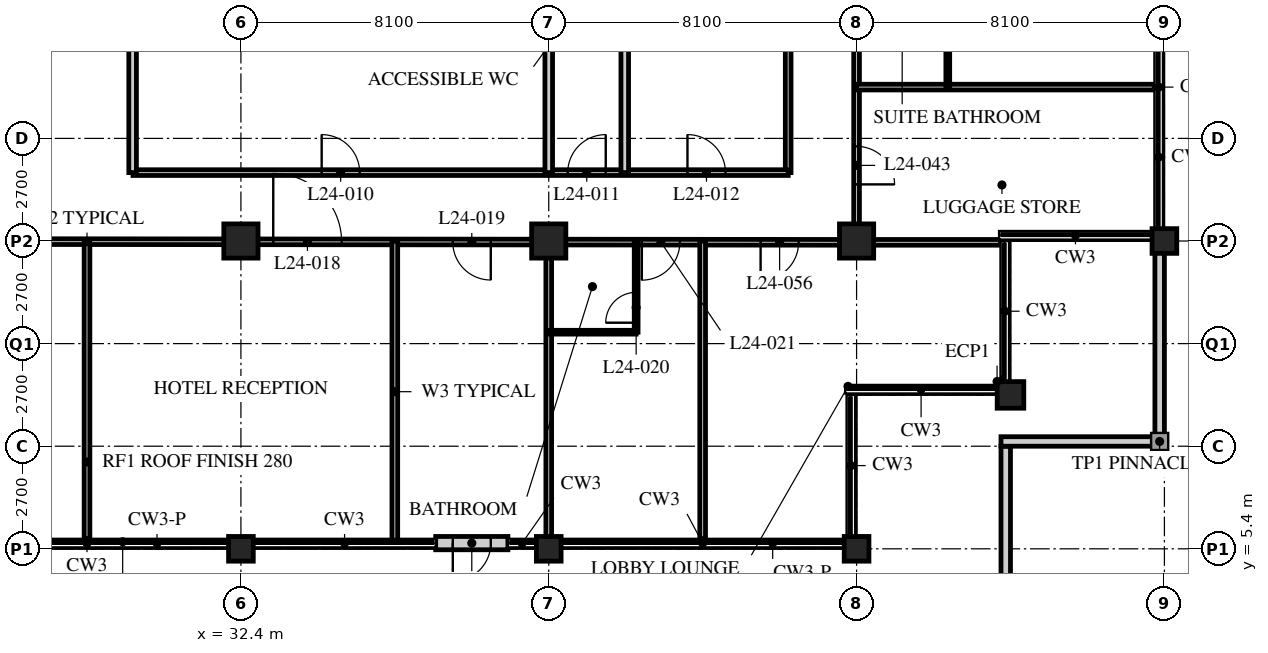
"""IFC4 building model, lengths in metres.
Left out: names, types, materials, properties, quantities, classifications, styles, units other than length and angle.
Written with IfcOpenShell. Run it as: python <this file> out.ifc"""

import sys

from ifc_helpers import new_model, si_unit, direction, frame, frame_2d, origin, origin_2d, place, context, subcontext, project, spatial, rectangle, hollow_rectangle, extrude, element, fill, save


model = new_model("IFC4")
c1 = context("Model", 3, precision=1e-05, world=origin(), true_north=direction((0.0, 1.0)))
c2 = subcontext(c1, "Body", "Model", "MODEL_VIEW")
j1 = project(units=[si_unit("LENGTHUNIT", "METRE"), si_unit("PLANEANGLEUNIT", "RADIAN")], contexts=[c1])
p1 = place(None, origin())
s1 = spatial("IfcSite", under=j1, at=p1, CompositionType="ELEMENT")
p2 = place(p1, origin())
s2 = spatial("IfcBuilding", under=s1, at=p2, CompositionType="ELEMENT")
p3 = place(p2, frame((0.0, 0.0, 98.0)))
s3 = spatial("IfcBuildingStorey", under=s2, at=p3, CompositionType="ELEMENT", Elevation=98.0)
p4 = place(p3, frame((32.4, 5.4, 0.0), z_axis=(0.0, 0.0, 1.0), x_axis=(1.0, 0.0, 0.0)))
e1 = element("IfcColumn", 1, at=p4, inside=s3, PredefinedType="COLUMN", context=c2, shape_type="SweptSolid", body=[
    extrude(hollow_rectangle(XDim=0.65, YDim=0.65, WallThickness=0.05, at=origin_2d()), origin(), (0.0, 0.0, 1.0), 5.4),
])
p5 = place(p3, frame((32.4, 13.5, 0.0), z_axis=(0.0, 0.0, 1.0), x_axis=(1.0, 0.0, 0.0)))
e2 = element("IfcColumn", 2, at=p5, inside=s3, PredefinedType="COLUMN", context=c2, shape_type="SweptSolid", body=[
    extrude(hollow_rectangle(XDim=0.9, YDim=0.9, WallThickness=0.1, at=origin_2d()), origin(), (0.0, 0.0, 1.0), 5.4),
])
p6 = place(p3, frame((40.5, 5.4, 0.0), z_axis=(0.0, 0.0, 1.0), x_axis=(1.0, 0.0, 0.0)))
e3 = element("IfcColumn", 3, at=p6, inside=s3, PredefinedType="COLUMN", context=c2, shape_type="SweptSolid", body=[
    extrude(hollow_rectangle(XDim=0.65, YDim=0.65, WallThickness=0.05, at=origin_2d()), origin(), (0.0, 0.0, 1.0), 5.4),
])
p7 = place(p3, frame((40.5, 13.5, 0.0), z_axis=(0.0, 0.0, 1.0), x_axis=(1.0, 0.0, 0.0)))
e4 = element("IfcColumn", 4, at=p7, inside=s3, PredefinedType="COLUMN", context=c2, shape_type="SweptSolid", body=[
    extrude(hollow_rectangle(XDim=0.9, YDim=0.9, WallThickness=0.1, at=origin_2d()), origin(), (0.0, 0.0, 1.0), 5.4),
])
p8 = place(p3, frame((48.6, 5.4, 0.0), z_axis=(0.0, 0.0, 1.0), x_axis=(1.0, 0.0, 0.0)))
e5 = element("IfcColumn", 5, at=p8, inside=s3, PredefinedType="COLUMN", context=c2, shape_type="SweptSolid", body=[
    extrude(hollow_rectangle(XDim=0.65, YDim=0.65, WallThickness=0.05, at=origin_2d()), origin(), (0.0, 0.0, 1.0), 5.4),
])
p9 = place(p3, frame((48.6, 13.5, 0.0), z_axis=(0.0, 0.0, 1.0), x_axis=(1.0, 0.0, 0.0)))
e6 = element("IfcColumn", 6, at=p9, inside=s3, PredefinedType="COLUMN", context=c2, shape_type="SweptSolid", body=[
    extrude(hollow_rectangle(XDim=0.9, YDim=0.9, WallThickness=0.1, at=origin_2d()), origin(), (0.0, 0.0, 1.0), 5.4),
])
p10 = place(p3, frame((52.65, 9.45, 0.0), z_axis=(0.0, 0.0, 1.0), x_axis=(1.0, 0.0, 0.0)))
e7 = element("IfcColumn", 7, at=p10, inside=s3, PredefinedType="COLUMN", context=c2, shape_type="SweptSolid", body=[
    extrude(hollow_rectangle(XDim=0.7, YDim=0.7, WallThickness=0.07, at=origin_2d()), origin(), (0.0, 0.0, 1.0), 5.4),
])
p11 = place(p3, frame((56.7, 13.5, 0.0), z_axis=(0.0, 0.0, 1.0), x_axis=(1.0, 0.0, 0.0)))
e8 = element("IfcColumn", 8, at=p11, inside=s3, PredefinedType="COLUMN", context=c2, shape_type="SweptSolid", body=[
    extrude(hollow_rectangle(XDim=0.65, YDim=0.65, WallThickness=0.05, at=origin_2d()), origin(), (0.0, 0.0, 1.0), 5.4),
])
p12 = place(p3, frame((37.525, 5.55, 0.0), z_axis=(0.0, 0.0, 1.0), x_axis=(1.0, 0.0, 0.0)))
e9 = element("IfcWall", 9, at=p12, inside=s3, PredefinedType="SOLIDWALL", context=c2, shape_type="SweptSolid", body=[
    extrude(rectangle(XDim=1.9, YDim=0.35, at=frame_2d((0.95, 0.0))), origin(), (0.0, 0.0, 1.0), 4.49),
])
p13 = place(p12, frame((0.45, 0.0, 0.0)))
e10 = element("IfcOpeningElement", 10, at=p13, cuts=e9, PredefinedType="OPENING", context=c2, shape_type="SweptSolid", body=[
    extrude(rectangle(XDim=1.0, YDim=2.1, at=frame_2d((0.5, 1.05))), frame((0.0, 0.185, 0.0), z_axis=(0.0, -1.0, 0.0), x_axis=(1.0, 0.0, 0.0)), (0.0, 0.0, 1.0), 0.37),
])
p14 = place(p3, frame((52.525, 4.3, 0.0), z_axis=(0.0, 0.0, 1.0), x_axis=(0.0, 1.0, 0.0)))
e11 = element("IfcWall", 11, at=p14, inside=s3, PredefinedType="PARAPET", context=c2, shape_type="SweptSolid", body=[
    extrude(rectangle(XDim=3.8, YDim=0.25, at=frame_2d((1.9, 0.0))), origin(), (0.0, 0.0, 1.0), 1.38),
])
p15 = place(p3, frame((52.4, 8.225, 0.0), z_axis=(0.0, 0.0, 1.0), x_axis=(1.0, 0.0, 0.0)))
e12 = element("IfcWall", 12, at=p15, inside=s3, PredefinedType="PARAPET", context=c2, shape_type="SweptSolid", body=[
    extrude(rectangle(XDim=4.3, YDim=0.25, at=frame_2d((2.15, 0.0))), origin(), (0.0, 0.0, 1.0), 1.38),
])
p16 = place(p3, frame((56.575, 8.35, 0.0), z_axis=(0.0, 0.0, 1.0), x_axis=(0.0, 1.0, 0.0)))
e13 = element("IfcWall", 13, at=p16, inside=s3, PredefinedType="PARAPET", context=c2, shape_type="SweptSolid", body=[
    extrude(rectangle(XDim=5.15, YDim=0.25, at=frame_2d((2.575, 0.0))), origin(), (0.0, 0.0, 1.0), 1.38),
])
p17 = place(p3, frame((8.1, 13.5, 0.0), z_axis=(0.0, 0.0, 1.0), x_axis=(0.999999628455, -0.000862027072, 0.0)))
e14 = element("IfcWall", 14, at=p17, inside=s3, PredefinedType="PARTITIONING", context=c2, shape_type="SweptSolid", body=[
    extrude(rectangle(XDim=40.5, YDim=0.15, at=frame_2d((20.25, 0.0))), origin(), (0.0, 0.0, 1.0), 4.49),
])
p18 = place(p17, frame((11.25, 0.0, 0.0)))
e15 = element("IfcOpeningElement", 15, at=p18, cuts=e14, PredefinedType="OPENING", context=c2, shape_type="SweptSolid", body=[
    extrude(rectangle(XDim=1.8, YDim=2.4, at=frame_2d((0.9, 1.2))), frame((0.0, 0.085, 0.0), z_axis=(0.0, -1.0, 0.0), x_axis=(1.0, 0.0, 0.0)), (0.0, 0.0, 1.0), 0.17),
])
p19 = place(p17, frame((25.15, 0.0, 0.0)))
e16 = element("IfcOpeningElement", 16, at=p19, cuts=e14, PredefinedType="OPENING", context=c2, shape_type="SweptSolid", body=[
    extrude(rectangle(XDim=1.8, YDim=2.4, at=frame_2d((0.9, 1.2))), frame((0.0, 0.085, 0.0), z_axis=(0.0, -1.0, 0.0), x_axis=(1.0, 0.0, 0.0)), (0.0, 0.0, 1.0), 0.17),
])
p20 = place(p17, frame((29.875, 0.0, 0.0)))
e17 = element("IfcOpeningElement", 17, at=p20, cuts=e14, PredefinedType="OPENING", context=c2, shape_type="SweptSolid", body=[
    extrude(rectangle(XDim=1.0, YDim=2.1, at=frame_2d((0.5, 1.05))), frame((0.0, 0.085, 0.0), z_axis=(0.0, -1.0, 0.0), x_axis=(1.0, 0.0, 0.0)), (0.0, 0.0, 1.0), 0.17),
])
p21 = place(p17, frame((34.85, 0.0, 0.0)))
e18 = element("IfcOpeningElement", 18, at=p21, cuts=e14, PredefinedType="OPENING", context=c2, shape_type="SweptSolid", body=[
    extrude(rectangle(XDim=1.0, YDim=2.1, at=frame_2d((0.5, 1.05))), frame((0.0, 0.085, 0.0), z_axis=(0.0, -1.0, 0.0), x_axis=(1.0, 0.0, 0.0)), (0.0, 0.0, 1.0), 0.17),
])
p22 = place(p17, frame((1.525, 0.0, 0.0)))
e19 = element("IfcOpeningElement", 19, at=p22, cuts=e14, PredefinedType="OPENING", context=c2, shape_type="SweptSolid", body=[
    extrude(rectangle(XDim=1.0, YDim=2.1, at=frame_2d((0.5, 1.05))), frame((0.0, 0.085, 0.0), z_axis=(0.0, -1.0, 0.0), x_axis=(1.0, 0.0, 0.0)), (0.0, 0.0, 1.0), 0.17),
])
p23 = place(p17, frame((37.975, 0.0, 0.0)))
e20 = element("IfcOpeningElement", 20, at=p23, cuts=e14, PredefinedType="OPENING", context=c2, shape_type="SweptSolid", body=[
    extrude(rectangle(XDim=1.0, YDim=2.1, at=frame_2d((0.5, 1.05))), frame((0.0, 0.085, 0.0), z_axis=(0.0, -1.0, 0.0), x_axis=(1.0, 0.0, 0.0)), (0.0, 0.0, 1.0), 0.17),
])
p24 = place(p3, frame((48.6, 13.465, 0.0), z_axis=(0.0, 0.0, 1.0), x_axis=(0.0, 1.0, 0.0)))
e21 = element("IfcWall", 21, at=p24, inside=s3, PredefinedType="PARTITIONING", context=c2, shape_type="SweptSolid", body=[
    extrude(rectangle(XDim=32.435, YDim=0.15, at=frame_2d((16.217, 0.0))), origin(), (0.0, 0.0, 1.0), 4.49),
])
p25 = place(p24, frame((1.525, 0.0, 0.0)))
e22 = element("IfcOpeningElement", 22, at=p25, cuts=e21, PredefinedType="OPENING", context=c2, shape_type="SweptSolid", body=[
    extrude(rectangle(XDim=1.0, YDim=2.1, at=frame_2d((0.5, 1.05))), frame((0.0, 0.085, 0.0), z_axis=(0.0, -1.0, 0.0), x_axis=(1.0, 0.0, 0.0)), (0.0, 0.0, 1.0), 0.17),
])
p26 = place(p24, frame((9.5, 0.0, 0.0)))
e23 = element("IfcOpeningElement", 23, at=p26, cuts=e21, PredefinedType="OPENING", context=c2, shape_type="SweptSolid", body=[
    extrude(rectangle(XDim=1.0, YDim=2.1, at=frame_2d((0.5, 1.05))), frame((0.0, 0.085, 0.0), z_axis=(0.0, -1.0, 0.0), x_axis=(1.0, 0.0, 0.0)), (0.0, 0.0, 1.0), 0.17),
])
p27 = place(p24, frame((17.6, 0.0, 0.0)))
e24 = element("IfcOpeningElement", 24, at=p27, cuts=e21, PredefinedType="OPENING", context=c2, shape_type="SweptSolid", body=[
    extrude(rectangle(XDim=1.0, YDim=2.1, at=frame_2d((0.5, 1.05))), frame((0.0, 0.085, 0.0), z_axis=(0.0, -1.0, 0.0), x_axis=(1.0, 0.0, 0.0)), (0.0, 0.0, 1.0), 0.17),
])
p28 = place(p24, frame((25.7, 0.0, 0.0)))
e25 = element("IfcOpeningElement", 25, at=p28, cuts=e21, PredefinedType="OPENING", context=c2, shape_type="SweptSolid", body=[
    extrude(rectangle(XDim=1.0, YDim=2.1, at=frame_2d((0.5, 1.05))), frame((0.0, 0.085, 0.0), z_axis=(0.0, -1.0, 0.0), x_axis=(1.0, 0.0, 0.0)), (0.0, 0.0, 1.0), 0.17),
])
p29 = place(p24, frame((28.95, 0.0, 0.0)))
e26 = element("IfcOpeningElement", 26, at=p29, cuts=e21, PredefinedType="OPENING", context=c2, shape_type="SweptSolid", body=[
    extrude(rectangle(XDim=1.0, YDim=2.1, at=frame_2d((0.5, 1.05))), frame((0.0, 0.085, 0.0), z_axis=(0.0, -1.0, 0.0), x_axis=(1.0, 0.0, 0.0)), (0.0, 0.0, 1.0), 0.17),
])
p30 = place(p3, frame((46.8, 15.3, 0.0), z_axis=(0.0, 0.0, 1.0), x_axis=(0.0, 1.0, 0.0)))
e27 = element("IfcWall", 27, at=p30, inside=s3, PredefinedType="PARTITIONING", context=c2, shape_type="SweptSolid", body=[
    extrude(rectangle(XDim=28.8, YDim=0.15, at=frame_2d((14.4, 0.0))), origin(), (0.0, 0.0, 1.0), 5.19),
])
p31 = place(p30, frame((9.775, 0.0, 0.0)))
e28 = element("IfcOpeningElement", 28, at=p31, cuts=e27, PredefinedType="OPENING", context=c2, shape_type="SweptSolid", body=[
    extrude(rectangle(XDim=0.85, YDim=2.1, at=frame_2d((0.425, 1.05))), frame((0.0, 0.085, 0.0), z_axis=(0.0, -1.0, 0.0), x_axis=(1.0, 0.0, 0.0)), (0.0, 0.0, 1.0), 0.17),
])
p32 = place(p30, frame((13.75, 0.0, 0.0)))
e29 = element("IfcOpeningElement", 29, at=p32, cuts=e27, PredefinedType="OPENING", context=c2, shape_type="SweptSolid", body=[
    extrude(rectangle(XDim=1.0, YDim=2.1, at=frame_2d((0.5, 1.05))), frame((0.0, 0.085, 0.0), z_axis=(0.0, -1.0, 0.0), x_axis=(1.0, 0.0, 0.0)), (0.0, 0.0, 1.0), 0.17),
])
p33 = place(p30, frame((20.65, 0.0, 0.0)))
e30 = element("IfcOpeningElement", 30, at=p33, cuts=e27, PredefinedType="OPENING", context=c2, shape_type="SweptSolid", body=[
    extrude(rectangle(XDim=1.0, YDim=2.1, at=frame_2d((0.5, 1.05))), frame((0.0, 0.085, 0.0), z_axis=(0.0, -1.0, 0.0), x_axis=(1.0, 0.0, 0.0)), (0.0, 0.0, 1.0), 0.17),
])
p34 = place(p3, frame((29.56, 15.3, 0.0), z_axis=(0.0, 0.0, 1.0), x_axis=(1.0, 0.0, 0.0)))
e31 = element("IfcWall", 31, at=p34, inside=s3, PredefinedType="PARTITIONING", context=c2, shape_type="SweptSolid", body=[
    extrude(rectangle(XDim=17.24, YDim=0.15, at=frame_2d((8.62, 0.0))), origin(), (0.0, 0.0, 1.0), 5.19),
])
p35 = place(p34, frame((4.965, 0.0, 0.0)))
e32 = element("IfcOpeningElement", 32, at=p35, cuts=e31, PredefinedType="OPENING", context=c2, shape_type="SweptSolid", body=[
    extrude(rectangle(XDim=1.0, YDim=2.1, at=frame_2d((0.5, 1.05))), frame((0.0, 0.085, 0.0), z_axis=(0.0, -1.0, 0.0), x_axis=(1.0, 0.0, 0.0)), (0.0, 0.0, 1.0), 0.17),
])
p36 = place(p34, frame((11.44, 0.0, 0.0)))
e33 = element("IfcOpeningElement", 33, at=p36, cuts=e31, PredefinedType="OPENING", context=c2, shape_type="SweptSolid", body=[
    extrude(rectangle(XDim=1.0, YDim=2.1, at=frame_2d((0.5, 1.05))), frame((0.0, 0.085, 0.0), z_axis=(0.0, -1.0, 0.0), x_axis=(1.0, 0.0, 0.0)), (0.0, 0.0, 1.0), 0.17),
])
p37 = place(p34, frame((14.59, 0.0, 0.0)))
e34 = element("IfcOpeningElement", 34, at=p37, cuts=e31, PredefinedType="OPENING", context=c2, shape_type="SweptSolid", body=[
    extrude(rectangle(XDim=1.0, YDim=2.1, at=frame_2d((0.5, 1.05))), frame((0.0, 0.085, 0.0), z_axis=(0.0, -1.0, 0.0), x_axis=(1.0, 0.0, 0.0)), (0.0, 0.0, 1.0), 0.17),
])
p38 = place(p3, frame((40.5, 15.3, 0.0), z_axis=(0.0, 0.0, 1.0), x_axis=(0.0, 1.0, 0.0)))
e35 = element("IfcWall", 35, at=p38, inside=s3, PredefinedType="SOLIDWALL", context=c2, shape_type="SweptSolid", body=[
    extrude(rectangle(XDim=9.0, YDim=0.2, at=frame_2d((4.5, 0.0))), origin(), (0.0, 0.0, 1.0), 4.49),
])
for number, where, z_axis, x_axis in (
    (36, (42.5, 15.3, 0.0), (0.0, 0.0, 1.0), (0.0, 1.0, 0.0)),
    (37, (29.55, 15.3, 0.0), (0.0, 0.0, 1.0), (0.0, 1.0, 0.0)),
):
    element("IfcWall", number, at=place(p3, frame(where, z_axis=z_axis, x_axis=x_axis)), inside=s3, PredefinedType="SOLIDWALL", context=c2, shape_type="SweptSolid", body=[
        extrude(rectangle(XDim=9.0, YDim=0.2, at=frame_2d((4.5, 0.0))), origin(), (0.0, 0.0, 1.0), 5.19),
    ])
p39 = place(p3, frame((28.35, 13.5, 0.0), z_axis=(0.0, 0.0, 1.0), x_axis=(0.0, -1.0, 0.0)))
e38 = element("IfcWall", 38, at=p39, inside=s3, PredefinedType="PARTITIONING", context=c2, shape_type="SweptSolid", body=[
    extrude(rectangle(XDim=7.834, YDim=0.15, at=frame_2d((3.917, 0.0))), origin(), (0.0, 0.0, 1.0), 5.19),
])
p40 = place(p3, frame((36.45, 13.5, 0.0), z_axis=(0.0, 0.0, 1.0), x_axis=(0.0, -1.0, 0.0)))
e39 = element("IfcWall", 39, at=p40, inside=s3, PredefinedType="PARTITIONING", context=c2, shape_type="SweptSolid", body=[
    extrude(rectangle(XDim=7.93, YDim=0.15, at=frame_2d((3.965, 0.0))), origin(), (0.0, 0.0, 1.0), 5.19),
])
p41 = place(p3, frame((40.5, 13.5, 0.0), z_axis=(0.0, 0.0, 1.0), x_axis=(0.0, -1.0, 0.0)))
e40 = element("IfcWall", 40, at=p41, inside=s3, PredefinedType="PARTITIONING", context=c2, shape_type="SweptSolid", body=[
    extrude(rectangle(XDim=7.8, YDim=0.15, at=frame_2d((3.9, 0.0))), origin(), (0.0, 0.0, 1.0), 4.49),
])
p42 = place(p3, frame((40.5, 11.1, 0.0), z_axis=(0.0, 0.0, 1.0), x_axis=(1.0, 0.0, 0.0)))
e41 = element("IfcWall", 41, at=p42, inside=s3, PredefinedType="PARTITIONING", context=c2, shape_type="SweptSolid", body=[
    extrude(rectangle(XDim=2.3, YDim=0.1, at=frame_2d((1.15, 0.0))), origin(), (0.0, 0.0, 1.0), 5.19),
])
p43 = place(p3, frame((42.8, 13.5, 0.0), z_axis=(0.0, 0.0, 1.0), x_axis=(0.0, -1.0, 0.0)))
e42 = element("IfcWall", 42, at=p43, inside=s3, PredefinedType="PARTITIONING", context=c2, shape_type="SweptSolid", body=[
    extrude(rectangle(XDim=2.4, YDim=0.1, at=frame_2d((1.2, 0.0))), origin(), (0.0, 0.0, 1.0), 5.19),
])
p44 = place(p43, frame((1.35, 0.0, 0.0)))
e43 = element("IfcOpeningElement", 43, at=p44, cuts=e42, PredefinedType="OPENING", context=c2, shape_type="SweptSolid", body=[
    extrude(rectangle(XDim=0.8, YDim=2.1, at=frame_2d((0.4, 1.05))), frame((0.0, 0.06, 0.0), z_axis=(0.0, -1.0, 0.0), x_axis=(1.0, 0.0, 0.0)), (0.0, 0.0, 1.0), 0.12),
])
p45 = place(p3, frame((48.6, 17.55, 0.0), z_axis=(0.0, 0.0, 1.0), x_axis=(1.0, 0.0, 0.0)))
e44 = element("IfcWall", 44, at=p45, inside=s3, PredefinedType="PARTITIONING", context=c2, shape_type="SweptSolid", body=[
    extrude(rectangle(XDim=7.834, YDim=0.15, at=frame_2d((3.917, 0.0))), origin(), (0.0, 0.0, 1.0), 5.19),
])
p46 = place(p3, frame((51.0, 17.55, 0.0), z_axis=(0.0, 0.0, 1.0), x_axis=(0.0, 1.0, 0.0)))
e45 = element("IfcWall", 45, at=p46, inside=s3, PredefinedType="PARTITIONING", context=c2, shape_type="SweptSolid", body=[
    extrude(rectangle(XDim=5.2, YDim=0.1, at=frame_2d((2.6, 0.0))), origin(), (0.0, 0.0, 1.0), 5.19),
])
p47 = place(p46, frame((1.3, 0.0, 0.0)))
e46 = element("IfcOpeningElement", 46, at=p47, cuts=e45, PredefinedType="OPENING", context=c2, shape_type="SweptSolid", body=[
    extrude(rectangle(XDim=0.8, YDim=2.1, at=frame_2d((0.4, 1.05))), frame((0.0, 0.06, 0.0), z_axis=(0.0, -1.0, 0.0), x_axis=(1.0, 0.0, 0.0)), (0.0, 0.0, 1.0), 0.12),
])
p48 = place(p46, frame((3.9, 0.0, 0.0)))
e47 = element("IfcOpeningElement", 47, at=p48, cuts=e45, PredefinedType="OPENING", context=c2, shape_type="SweptSolid", body=[
    extrude(rectangle(XDim=0.8, YDim=2.1, at=frame_2d((0.4, 1.05))), frame((0.0, 0.06, 0.0), z_axis=(0.0, -1.0, 0.0), x_axis=(1.0, 0.0, 0.0)), (0.0, 0.0, 1.0), 0.12),
])
p49 = place(p3, frame((48.6, 13.465, 0.0), z_axis=(0.0, 0.0, 1.0), x_axis=(1.0, 0.0, 0.0)))
e48 = element("IfcWall", 48, at=p49, inside=s3, PredefinedType="PARTITIONING", context=c2, shape_type="SweptSolid", body=[
    extrude(rectangle(XDim=3.784, YDim=0.15, at=frame_2d((1.892, 0.0))), origin(), (0.0, 0.0, 1.0), 4.49),
])
p50 = place(p3, frame((44.55, 13.5, 0.0), z_axis=(0.0, 0.0, 1.0), x_axis=(0.0, -1.0, 0.0)))
e49 = element("IfcWall", 49, at=p50, inside=s3, PredefinedType="PARTITIONING", context=c2, shape_type="SweptSolid", body=[
    extrude(rectangle(XDim=7.834, YDim=0.15, at=frame_2d((3.917, 0.0))), origin(), (0.0, 0.0, 1.0), 5.19),
])
p51 = place(p13, origin())
e50 = element("IfcDoor", 50, at=p51, inside=s3, OperationType="SINGLE_SWING_RIGHT", PredefinedType="DOOR", context=c2, shape_type="SweptSolid", body=[
    extrude(rectangle(XDim=1.0, YDim=2.1, at=frame_2d((0.5, 1.05))), frame((0.0, 0.025, 0.0), z_axis=(0.0, -1.0, 0.0), x_axis=(1.0, 0.0, 0.0)), (0.0, 0.0, 1.0), 0.05),
])
fill(e10, e50)
p52 = place(p35, origin())
e51 = element("IfcDoor", 51, at=p52, inside=s3, OperationType="SINGLE_SWING_LEFT", PredefinedType="DOOR", context=c2, shape_type="SweptSolid", body=[
    extrude(rectangle(XDim=1.0, YDim=2.1, at=frame_2d((0.5, 1.05))), frame((0.0, 0.025, 0.0), z_axis=(0.0, -1.0, 0.0), x_axis=(1.0, 0.0, 0.0)), (0.0, 0.0, 1.0), 0.05),
])
fill(e32, e51)
p53 = place(p36, origin())
e52 = element("IfcDoor", 52, at=p53, inside=s3, OperationType="SINGLE_SWING_RIGHT", PredefinedType="DOOR", context=c2, shape_type="SweptSolid", body=[
    extrude(rectangle(XDim=1.0, YDim=2.1, at=frame_2d((0.5, 1.05))), frame((0.0, 0.025, 0.0), z_axis=(0.0, -1.0, 0.0), x_axis=(1.0, 0.0, 0.0)), (0.0, 0.0, 1.0), 0.05),
])
fill(e33, e52)
p54 = place(p37, origin())
e53 = element("IfcDoor", 53, at=p54, inside=s3, OperationType="SINGLE_SWING_LEFT", PredefinedType="DOOR", context=c2, shape_type="SweptSolid", body=[
    extrude(rectangle(XDim=1.0, YDim=2.1, at=frame_2d((0.5, 1.05))), frame((0.0, 0.025, 0.0), z_axis=(0.0, -1.0, 0.0), x_axis=(1.0, 0.0, 0.0)), (0.0, 0.0, 1.0), 0.05),
])
fill(e34, e53)
p55 = place(p19, origin())
e54 = element("IfcDoor", 54, at=p55, inside=s3, OperationType="DOUBLE_DOOR_SINGLE_SWING", PredefinedType="DOOR", context=c2, shape_type="SweptSolid", body=[
    extrude(rectangle(XDim=1.8, YDim=2.4, at=frame_2d((0.9, 1.2))), frame((0.0, 0.025, 0.0), z_axis=(0.0, -1.0, 0.0), x_axis=(1.0, 0.0, 0.0)), (0.0, 0.0, 1.0), 0.05),
])
fill(e16, e54)
p56 = place(p20, origin())
e55 = element("IfcDoor", 55, at=p56, inside=s3, OperationType="SINGLE_SWING_LEFT", PredefinedType="DOOR", context=c2, shape_type="SweptSolid", body=[
    extrude(rectangle(XDim=1.0, YDim=2.1, at=frame_2d((0.5, 1.05))), frame((0.0, 0.025, 0.0), z_axis=(0.0, -1.0, 0.0), x_axis=(1.0, 0.0, 0.0)), (0.0, 0.0, 1.0), 0.05),
])
fill(e17, e55)
p57 = place(p44, origin())
e56 = element("IfcDoor", 56, at=p57, inside=s3, OperationType="SINGLE_SWING_LEFT", PredefinedType="DOOR", context=c2, shape_type="SweptSolid", body=[
    extrude(rectangle(XDim=0.8, YDim=2.1, at=frame_2d((0.4, 1.05))), frame((0.0, 0.025, 0.0), z_axis=(0.0, -1.0, 0.0), x_axis=(1.0, 0.0, 0.0)), (0.0, 0.0, 1.0), 0.05),
])
fill(e43, e56)
p58 = place(p21, origin())
e57 = element("IfcDoor", 57, at=p58, inside=s3, OperationType="SINGLE_SWING_RIGHT", PredefinedType="DOOR", context=c2, shape_type="SweptSolid", body=[
    extrude(rectangle(XDim=1.0, YDim=2.1, at=frame_2d((0.5, 1.05))), frame((0.0, 0.025, 0.0), z_axis=(0.0, -1.0, 0.0), x_axis=(1.0, 0.0, 0.0)), (0.0, 0.0, 1.0), 0.05),
])
fill(e18, e57)
p59 = place(p25, origin())
e58 = element("IfcDoor", 58, at=p59, inside=s3, OperationType="SINGLE_SWING_RIGHT", PredefinedType="DOOR", context=c2, shape_type="SweptSolid", body=[
    extrude(rectangle(XDim=1.0, YDim=2.1, at=frame_2d((0.5, 1.05))), frame((0.0, 0.025, 0.0), z_axis=(0.0, -1.0, 0.0), x_axis=(1.0, 0.0, 0.0)), (0.0, 0.0, 1.0), 0.05),
])
fill(e22, e58)
p60 = place(p23, origin())
e59 = element("IfcDoor", 59, at=p60, inside=s3, OperationType="SINGLE_SWING_RIGHT", PredefinedType="DOOR", context=c2, shape_type="SweptSolid", body=[
    extrude(rectangle(XDim=1.0, YDim=2.1, at=frame_2d((0.5, 1.05))), frame((0.0, 0.025, 0.0), z_axis=(0.0, -1.0, 0.0), x_axis=(1.0, 0.0, 0.0)), (0.0, 0.0, 1.0), 0.05),
])
fill(e20, e59)
save(model, sys.argv[1])
